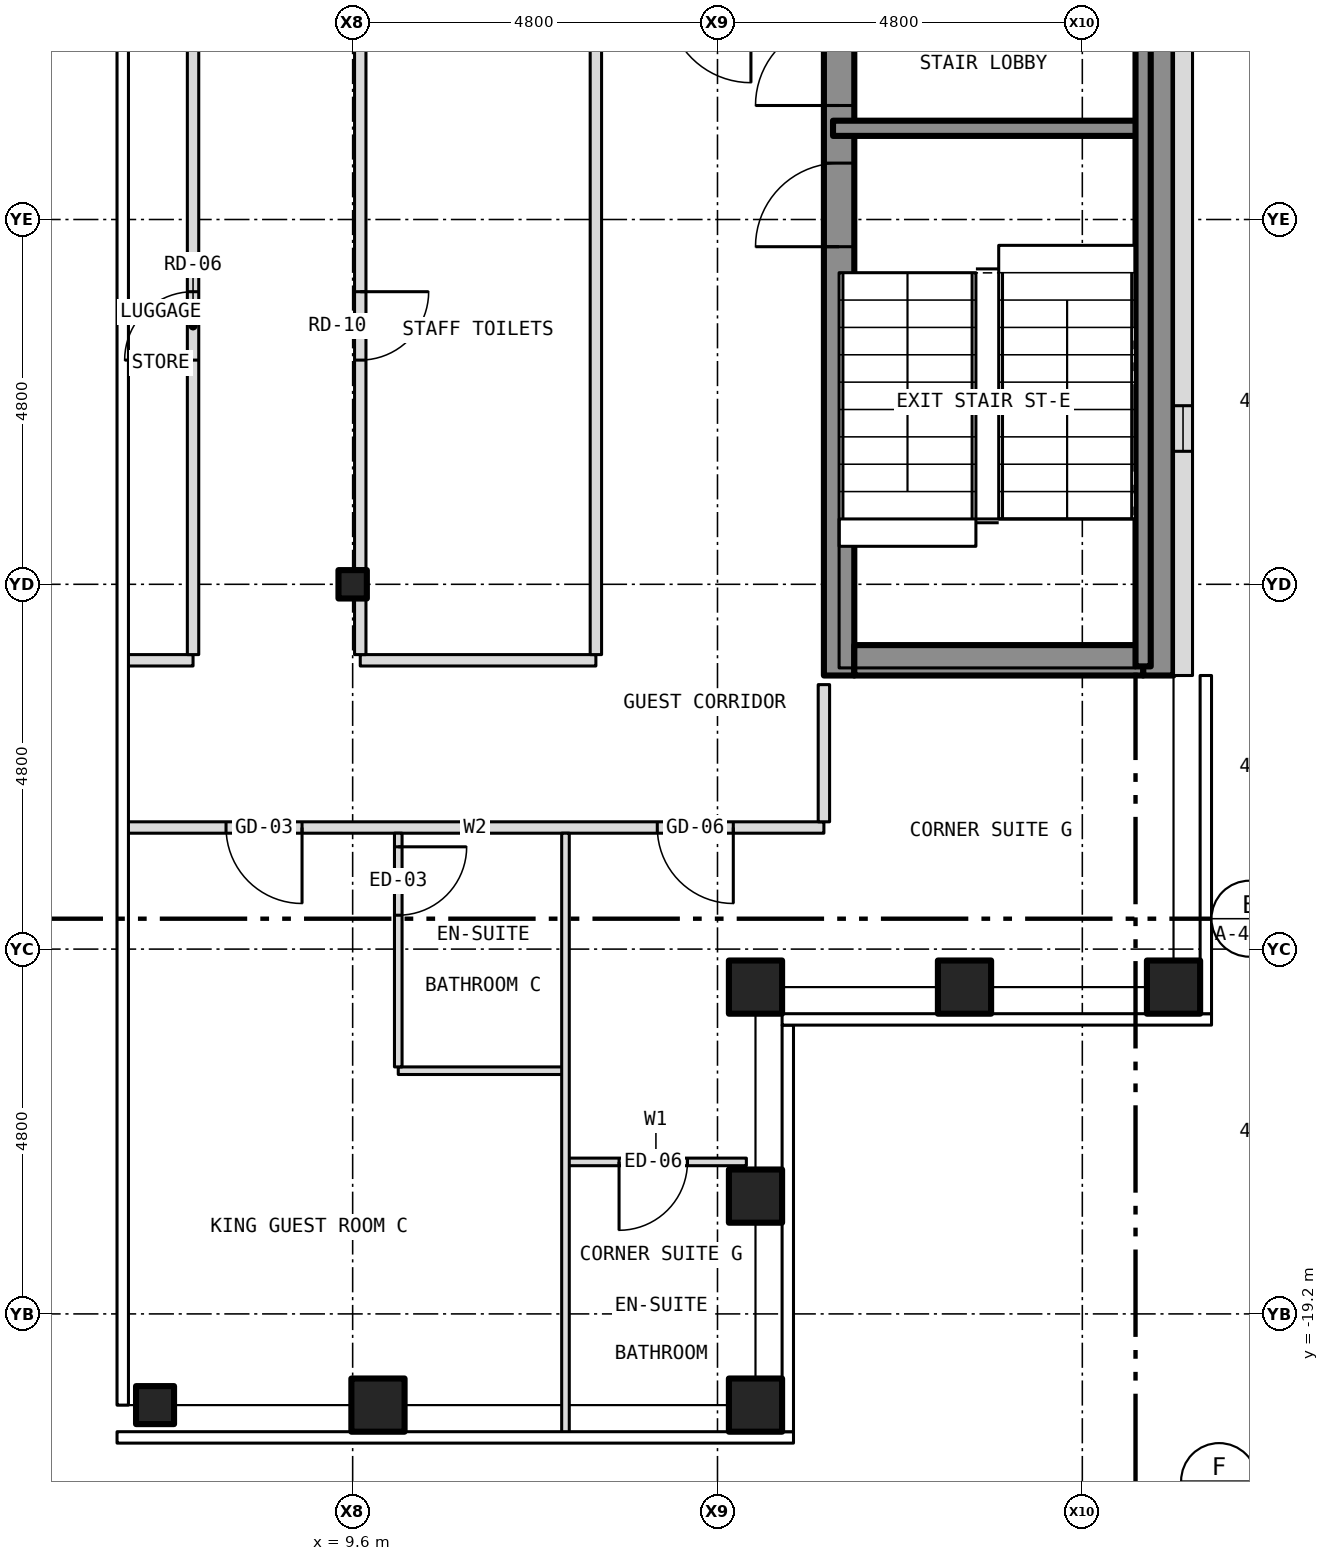
"""IFC4 building model, lengths in metres.
Left out: names, types, materials, properties, quantities, classifications, styles, units other than length and angle.
Written with IfcOpenShell. Run it as: python <this file> out.ifc"""

import sys

from ifc_helpers import new_model, si_unit, direction, frame, frame_2d, origin, origin_2d, place, context, subcontext, project, spatial, rectangle, hollow_rectangle, i_section, extrude, element, fill, save


model = new_model("IFC4")
c1 = context("Model", 3, precision=1e-05, world=origin(), true_north=direction((0.0, 1.0)))
c2 = subcontext(c1, "Body", "Model", "MODEL_VIEW")
j1 = project(units=[si_unit("LENGTHUNIT", "METRE"), si_unit("PLANEANGLEUNIT", "RADIAN")], contexts=[c1])
p1 = place(None, origin())
s1 = spatial("IfcSite", under=j1, at=p1, CompositionType="ELEMENT")
p2 = place(p1, origin())
s2 = spatial("IfcBuilding", under=s1, at=p2, CompositionType="ELEMENT")
p3 = place(p2, frame((0.0, 0.0, 233.0)))
s3 = spatial("IfcBuildingStorey", under=s2, at=p3, CompositionType="ELEMENT", Elevation=233.0)
for number, where, z_axis, x_axis in (
    (1, (9.933, -20.4, -0.15), (0.0, 0.0, 1.0), (1.0, 0.0, 0.0)),
    (2, (14.9, -20.4, -0.15), (0.0, 0.0, 1.0), (1.0, 0.0, 0.0)),
    (3, (20.4, -14.9, -0.15), (0.0, 0.0, 1.0), (1.0, 0.0, 0.0)),
    (4, (14.9, -14.9, -0.15), (0.0, 0.0, 1.0), (1.0, 0.0, 0.0)),
    (5, (14.9, -17.65, -0.15), (0.0, 0.0, 1.0), (1.0, 0.0, 0.0)),
    (6, (17.65, -14.9, -0.15), (0.0, 0.0, 1.0), (1.0, 0.0, 0.0)),
):
    element("IfcColumn", number, at=place(p3, frame(where, z_axis=z_axis, x_axis=x_axis)), inside=s3, PredefinedType="COLUMN", context=c2, shape_type="SweptSolid", body=[
        extrude(hollow_rectangle(XDim=0.7, YDim=0.7, WallThickness=0.04, at=origin_2d()), origin(), (0.0, 0.0, 1.0), 3.35),
    ])
p4 = place(p3, frame((7.0, -20.4, -0.15), z_axis=(0.0, 0.0, 1.0), x_axis=(1.0, 0.0, 0.0)))
e7 = element("IfcColumn", 7, at=p4, inside=s3, PredefinedType="COLUMN", context=c2, shape_type="SweptSolid", body=[
    extrude(hollow_rectangle(XDim=0.5, YDim=0.5, WallThickness=0.03, at=origin_2d()), origin(), (0.0, 0.0, 1.0), 3.35),
])
p5 = place(p3, frame((9.6, -9.6, -0.15), z_axis=(0.0, 0.0, 1.0), x_axis=(1.0, 0.0, 0.0)))
e8 = element("IfcColumn", 8, at=p5, inside=s3, PredefinedType="COLUMN", context=c2, shape_type="SweptSolid", body=[
    extrude(i_section(OverallWidth=0.373, OverallDepth=0.373, WebThickness=0.016, FlangeThickness=0.026, at=origin_2d()), origin(), (0.0, 0.0, 1.0), 3.35),
])
p6 = place(p3, frame((16.0, -10.8, 0.0), z_axis=(0.0, 0.0, 1.0), x_axis=(0.0, 1.0, 0.0)))
e9 = element("IfcWall", 9, at=p6, inside=s3, PredefinedType="SHEAR", context=c2, shape_type="SweptSolid", body=[
    extrude(rectangle(XDim=21.6, YDim=0.4, at=frame_2d((10.8, 0.0))), origin(), (0.0, 0.0, 1.0), 2.9),
])
p7 = place(p6, frame((9.4, 0.0, 0.0)))
e10 = element("IfcOpeningElement", 10, at=p7, cuts=e9, PredefinedType="OPENING", context=c2, shape_type="SweptSolid", body=[
    extrude(rectangle(XDim=1.1, YDim=2.1, at=frame_2d((0.55, 1.05))), frame((0.0, 0.212, 0.0), z_axis=(0.0, -1.0, 0.0), x_axis=(1.0, 0.0, 0.0)), (0.0, 0.0, 1.0), 0.424),
])
p8 = place(p6, frame((11.5, 0.0, 0.0)))
e11 = element("IfcOpeningElement", 11, at=p8, cuts=e9, PredefinedType="OPENING", context=c2, shape_type="SweptSolid", body=[
    extrude(rectangle(XDim=1.1, YDim=2.1, at=frame_2d((0.55, 1.05))), frame((0.0, 0.212, 0.0), z_axis=(0.0, -1.0, 0.0), x_axis=(1.0, 0.0, 0.0)), (0.0, 0.0, 1.0), 0.424),
])
p9 = place(p6, frame((13.6, 0.0, 0.0)))
e12 = element("IfcOpeningElement", 12, at=p9, cuts=e9, PredefinedType="OPENING", context=c2, shape_type="SweptSolid", body=[
    extrude(rectangle(XDim=1.1, YDim=2.1, at=frame_2d((0.55, 1.05))), frame((0.0, 0.212, 0.0), z_axis=(0.0, -1.0, 0.0), x_axis=(1.0, 0.0, 0.0)), (0.0, 0.0, 1.0), 0.424),
])
p10 = place(p6, frame((15.7, 0.0, 0.0)))
e13 = element("IfcOpeningElement", 13, at=p10, cuts=e9, PredefinedType="OPENING", context=c2, shape_type="SweptSolid", body=[
    extrude(rectangle(XDim=1.1, YDim=2.1, at=frame_2d((0.55, 1.05))), frame((0.0, 0.212, 0.0), z_axis=(0.0, -1.0, 0.0), x_axis=(1.0, 0.0, 0.0)), (0.0, 0.0, 1.0), 0.424),
])
p11 = place(p6, frame((17.8, 0.0, 0.0)))
e14 = element("IfcOpeningElement", 14, at=p11, cuts=e9, PredefinedType="OPENING", context=c2, shape_type="SweptSolid", body=[
    extrude(rectangle(XDim=1.1, YDim=2.1, at=frame_2d((0.55, 1.05))), frame((0.0, 0.212, 0.0), z_axis=(0.0, -1.0, 0.0), x_axis=(1.0, 0.0, 0.0)), (0.0, 0.0, 1.0), 0.424),
])
p12 = place(p6, frame((5.642, 0.0, 0.0)))
e15 = element("IfcOpeningElement", 15, at=p12, cuts=e9, PredefinedType="OPENING", context=c2, shape_type="SweptSolid", body=[
    extrude(rectangle(XDim=1.1, YDim=2.1, at=frame_2d((0.55, 1.05))), frame((0.0, 0.212, 0.0), z_axis=(0.0, -1.0, 0.0), x_axis=(1.0, 0.0, 0.0)), (0.0, 0.0, 1.0), 0.424),
])
p13 = place(p6, frame((7.5, 0.0, 0.0)))
e16 = element("IfcOpeningElement", 16, at=p13, cuts=e9, PredefinedType="OPENING", context=c2, shape_type="SweptSolid", body=[
    extrude(rectangle(XDim=1.1, YDim=2.1, at=frame_2d((0.55, 1.05))), frame((0.0, 0.212, 0.0), z_axis=(0.0, -1.0, 0.0), x_axis=(1.0, 0.0, 0.0)), (0.0, 0.0, 1.0), 0.424),
])
p14 = place(p6, frame((20.0, 0.0, 0.0)))
e17 = element("IfcOpeningElement", 17, at=p14, cuts=e9, PredefinedType="OPENING", context=c2, shape_type="SweptSolid", body=[
    extrude(rectangle(XDim=0.9, YDim=2.1, at=frame_2d((0.45, 1.05))), frame((0.0, 0.212, 0.0), z_axis=(0.0, -1.0, 0.0), x_axis=(1.0, 0.0, 0.0)), (0.0, 0.0, 1.0), 0.424),
])
p15 = place(p3, frame((20.2, -10.8, 0.0), z_axis=(0.0, 0.0, 1.0), x_axis=(0.0, 1.0, 0.0)))
e18 = element("IfcWall", 18, at=p15, inside=s3, PredefinedType="SHEAR", context=c2, shape_type="SweptSolid", body=[
    extrude(rectangle(XDim=21.6, YDim=0.4, at=frame_2d((10.8, 0.0))), origin(), (0.0, 0.0, 1.0), 2.9),
])
p16 = place(p3, frame((16.2, -10.6, 0.0), z_axis=(0.0, 0.0, 1.0), x_axis=(1.0, 0.0, 0.0)))
e19 = element("IfcWall", 19, at=p16, inside=s3, PredefinedType="SHEAR", context=c2, shape_type="SweptSolid", body=[
    extrude(rectangle(XDim=3.8, YDim=0.4, at=frame_2d((1.9, 0.0))), origin(), (0.0, 0.0, 1.0), 2.9),
])
p17 = place(p3, frame((20.525, -10.8, 0.0), z_axis=(0.0, 0.0, 1.0), x_axis=(0.0, 1.0, 0.0)))
e20 = element("IfcWall", 20, at=p17, inside=s3, PredefinedType="SOLIDWALL", context=c2, shape_type="SweptSolid", body=[
    extrude(rectangle(XDim=21.6, YDim=0.25, at=frame_2d((10.8, 0.0))), origin(), (0.0, 0.0, 1.0), 3.5),
])
p18 = place(p17, frame((2.95, 0.0, 1.0)))
e21 = element("IfcOpeningElement", 21, at=p18, cuts=e20, PredefinedType="OPENING", context=c2, shape_type="SweptSolid", body=[
    extrude(rectangle(XDim=0.6, YDim=1.5, at=frame_2d((0.3, 0.75))), frame((0.0, 0.137, 0.0), z_axis=(0.0, -1.0, 0.0), x_axis=(1.0, 0.0, 0.0)), (0.0, 0.0, 1.0), 0.274),
])
p19 = place(p3, frame((12.4, -17.2, 0.0), z_axis=(0.0, 0.0, 1.0), x_axis=(1.0, 0.0, 0.0)))
e22 = element("IfcWall", 22, at=p19, inside=s3, PredefinedType="PARTITIONING", context=c2, shape_type="SweptSolid", body=[
    extrude(rectangle(XDim=2.38, YDim=0.1, at=frame_2d((1.19, 0.0))), origin(), (0.0, 0.0, 1.0), 3.2),
])
p20 = place(p19, frame((0.705, 0.0, 0.0)))
e23 = element("IfcOpeningElement", 23, at=p20, cuts=e22, PredefinedType="OPENING", context=c2, shape_type="SweptSolid", body=[
    extrude(rectangle(XDim=0.9, YDim=2.1, at=frame_2d((0.45, 1.05))), frame((0.0, 0.062, 0.0), z_axis=(0.0, -1.0, 0.0), x_axis=(1.0, 0.0, 0.0)), (0.0, 0.0, 1.0), 0.124),
])
p21 = place(p3, frame((10.2, -16.0, 0.0), z_axis=(0.0, 0.0, 1.0), x_axis=(1.0, 0.0, 0.0)))
e24 = element("IfcWall", 24, at=p21, inside=s3, PredefinedType="PARTITIONING", context=c2, shape_type="SweptSolid", body=[
    extrude(rectangle(XDim=2.2, YDim=0.1, at=frame_2d((1.1, 0.0))), origin(), (0.0, 0.0, 1.0), 3.2),
])
p22 = place(p3, frame((6.62, -12.8, 0.0), z_axis=(0.0, 0.0, 1.0), x_axis=(1.0, 0.0, 0.0)))
e25 = element("IfcWall", 25, at=p22, inside=s3, PredefinedType="PARTITIONING", context=c2, shape_type="SweptSolid", body=[
    extrude(rectangle(XDim=9.18, YDim=0.15, at=frame_2d((4.59, 0.0))), origin(), (0.0, 0.0, 1.0), 3.2),
])
p23 = place(p22, frame((1.314, 0.0, 0.0)))
e26 = element("IfcOpeningElement", 26, at=p23, cuts=e25, PredefinedType="OPENING", context=c2, shape_type="SweptSolid", body=[
    extrude(rectangle(XDim=1.0, YDim=2.1, at=frame_2d((0.5, 1.05))), frame((0.0, 0.087, 0.0), z_axis=(0.0, -1.0, 0.0), x_axis=(1.0, 0.0, 0.0)), (0.0, 0.0, 1.0), 0.174),
])
p24 = place(p22, frame((6.988, 0.0, 0.0)))
e27 = element("IfcOpeningElement", 27, at=p24, cuts=e25, PredefinedType="OPENING", context=c2, shape_type="SweptSolid", body=[
    extrude(rectangle(XDim=1.0, YDim=2.1, at=frame_2d((0.5, 1.05))), frame((0.0, 0.087, 0.0), z_axis=(0.0, -1.0, 0.0), x_axis=(1.0, 0.0, 0.0)), (0.0, 0.0, 1.0), 0.174),
])
p25 = place(p3, frame((6.62, -10.6, 0.0), z_axis=(0.0, 0.0, 1.0), x_axis=(1.0, 0.0, 0.0)))
e28 = element("IfcWall", 28, at=p25, inside=s3, PredefinedType="PARTITIONING", context=c2, shape_type="SweptSolid", body=[
    extrude(rectangle(XDim=0.88, YDim=0.15, at=frame_2d((0.44, 0.0))), origin(), (0.0, 0.0, 1.0), 3.2),
])
p26 = place(p3, frame((9.7, -10.6, 0.0), z_axis=(0.0, 0.0, 1.0), x_axis=(1.0, 0.0, 0.0)))
e29 = element("IfcWall", 29, at=p26, inside=s3, PredefinedType="PARTITIONING", context=c2, shape_type="SweptSolid", body=[
    extrude(rectangle(XDim=3.1, YDim=0.15, at=frame_2d((1.55, 0.0))), origin(), (0.0, 0.0, 1.0), 3.2),
])
p27 = place(p3, frame((15.92, -3.6, 0.0), z_axis=(0.0, 0.0, 1.0), x_axis=(1.0, 0.0, 0.0)))
e30 = element("IfcWall", 30, at=p27, inside=s3, PredefinedType="SHEAR", context=c2, shape_type="SweptSolid", body=[
    extrude(rectangle(XDim=4.08, YDim=0.2, at=frame_2d((2.04, 0.0))), origin(), (0.0, 0.0, 1.0), 2.9),
])
p28 = place(p3, frame((7.5, -10.525, 0.0), z_axis=(0.0, 0.0, 1.0), x_axis=(0.0, 1.0, 0.0)))
e31 = element("IfcWall", 31, at=p28, inside=s3, PredefinedType="PARTITIONING", context=c2, shape_type="SweptSolid", body=[
    extrude(rectangle(XDim=8.725, YDim=0.15, at=frame_2d((4.362, 0.0))), origin(), (0.0, 0.0, 1.0), 3.2),
])
p29 = place(p28, frame((3.875, 0.0, 0.0)))
e32 = element("IfcOpeningElement", 32, at=p29, cuts=e31, PredefinedType="OPENING", context=c2, shape_type="SweptSolid", body=[
    extrude(rectangle(XDim=0.9, YDim=2.1, at=frame_2d((0.45, 1.05))), frame((0.0, 0.087, 0.0), z_axis=(0.0, -1.0, 0.0), x_axis=(1.0, 0.0, 0.0)), (0.0, 0.0, 1.0), 0.174),
])
p30 = place(p3, frame((9.7, -10.525, 0.0), z_axis=(0.0, 0.0, 1.0), x_axis=(0.0, 1.0, 0.0)))
e33 = element("IfcWall", 33, at=p30, inside=s3, PredefinedType="PARTITIONING", context=c2, shape_type="SweptSolid", body=[
    extrude(rectangle(XDim=0.725, YDim=0.15, at=frame_2d((0.362, 0.0))), origin(), (0.0, 0.0, 1.0), 2.578),
])
p31 = place(p3, frame((9.7, -9.8, 0.0), z_axis=(0.0, 0.0, 1.0), x_axis=(0.0, 1.0, 0.0)))
e34 = element("IfcWall", 34, at=p31, inside=s3, PredefinedType="PARTITIONING", context=c2, shape_type="SweptSolid", body=[
    extrude(rectangle(XDim=0.401, YDim=0.15, at=frame_2d((0.201, 0.0))), origin(), (0.0, 0.0, 1.0), 3.2),
])
p32 = place(p3, frame((9.7, -9.399, 0.0), z_axis=(0.0, 0.0, 1.0), x_axis=(0.0, 1.0, 0.0)))
e35 = element("IfcWall", 35, at=p32, inside=s3, PredefinedType="PARTITIONING", context=c2, shape_type="SweptSolid", body=[
    extrude(rectangle(XDim=7.524, YDim=0.15, at=frame_2d((3.762, 0.0))), origin(), (0.0, 0.0, 1.0), 2.578),
])
p33 = place(p32, frame((2.749, 0.0, 0.0)))
e36 = element("IfcOpeningElement", 36, at=p33, cuts=e35, PredefinedType="OPENING", context=c2, shape_type="SweptSolid", body=[
    extrude(rectangle(XDim=0.9, YDim=2.1, at=frame_2d((0.45, 1.05))), frame((0.0, 0.087, 0.0), z_axis=(0.0, -1.0, 0.0), x_axis=(1.0, 0.0, 0.0)), (0.0, 0.0, 1.0), 0.174),
])
p34 = place(p3, frame((10.2, -15.95, 0.0), z_axis=(0.0, 0.0, 1.0), x_axis=(0.0, 1.0, 0.0)))
e37 = element("IfcWall", 37, at=p34, inside=s3, PredefinedType="PARTITIONING", context=c2, shape_type="SweptSolid", body=[
    extrude(rectangle(XDim=3.075, YDim=0.1, at=frame_2d((1.538, 0.0))), origin(), (0.0, 0.0, 1.0), 3.2),
])
p35 = place(p34, frame((1.996, 0.0, 0.0)))
e38 = element("IfcOpeningElement", 38, at=p35, cuts=e37, PredefinedType="OPENING", context=c2, shape_type="SweptSolid", body=[
    extrude(rectangle(XDim=0.9, YDim=2.1, at=frame_2d((0.45, 1.05))), frame((0.0, 0.062, 0.0), z_axis=(0.0, -1.0, 0.0), x_axis=(1.0, 0.0, 0.0)), (0.0, 0.0, 1.0), 0.124),
])
p36 = place(p3, frame((12.4, -20.78, 0.0), z_axis=(0.0, 0.0, 1.0), x_axis=(0.0, 1.0, 0.0)))
e39 = element("IfcWall", 39, at=p36, inside=s3, PredefinedType="PARTITIONING", context=c2, shape_type="SweptSolid", body=[
    extrude(rectangle(XDim=7.905, YDim=0.1, at=frame_2d((3.953, 0.0))), origin(), (0.0, 0.0, 1.0), 3.2),
])
p37 = place(p3, frame((12.8, -10.525, 0.0), z_axis=(0.0, 0.0, 1.0), x_axis=(0.0, 1.0, 0.0)))
e40 = element("IfcWall", 40, at=p37, inside=s3, PredefinedType="PARTITIONING", context=c2, shape_type="SweptSolid", body=[
    extrude(rectangle(XDim=8.525, YDim=0.15, at=frame_2d((4.262, 0.0))), origin(), (0.0, 0.0, 1.0), 3.2),
])
p38 = place(p3, frame((15.8, -12.725, 0.0), z_axis=(0.0, 0.0, 1.0), x_axis=(0.0, 1.0, 0.0)))
e41 = element("IfcWall", 41, at=p38, inside=s3, PredefinedType="PARTITIONING", context=c2, shape_type="SweptSolid", body=[
    extrude(rectangle(XDim=1.805, YDim=0.15, at=frame_2d((0.903, 0.0))), origin(), (0.0, 0.0, 1.0), 3.2),
])
p39 = place(p3, frame((20.0, -10.68, 0.0), z_axis=(0.0, 0.0, 1.0), x_axis=(0.0, 1.0, 0.0)))
e42 = element("IfcWall", 42, at=p39, inside=s3, PredefinedType="SHEAR", context=c2, shape_type="SweptSolid", body=[
    extrude(rectangle(XDim=8.68, YDim=0.2, at=frame_2d((4.34, 0.0))), origin(), (0.0, 0.0, 1.0), 2.9),
])
p40 = place(p18, origin())
e43 = element("IfcWindow", 43, at=p40, inside=s3, PartitioningType="SINGLE_PANEL", PredefinedType="WINDOW", context=c2, shape_type="SweptSolid", body=[
    extrude(rectangle(XDim=0.6, YDim=1.5, at=frame_2d((0.3, 0.75))), frame((0.0, -0.035, 0.0), z_axis=(0.0, -1.0, 0.0), x_axis=(1.0, 0.0, 0.0)), (0.0, 0.0, 1.0), 0.06),
])
fill(e21, e43)
p41 = place(p12, origin())
e44 = element("IfcDoor", 44, at=p41, inside=s3, OperationType="SINGLE_SWING_LEFT", PredefinedType="DOOR", context=c2, shape_type="SweptSolid", body=[
    extrude(rectangle(XDim=1.1, YDim=2.1, at=frame_2d((0.55, 1.05))), frame((0.0, 0.025, 0.0), z_axis=(0.0, -1.0, 0.0), x_axis=(1.0, 0.0, 0.0)), (0.0, 0.0, 1.0), 0.05),
])
fill(e15, e44)
p42 = place(p13, origin())
e45 = element("IfcDoor", 45, at=p42, inside=s3, OperationType="SINGLE_SWING_LEFT", PredefinedType="DOOR", context=c2, shape_type="SweptSolid", body=[
    extrude(rectangle(XDim=1.1, YDim=2.1, at=frame_2d((0.55, 1.05))), frame((0.0, 0.025, 0.0), z_axis=(0.0, -1.0, 0.0), x_axis=(1.0, 0.0, 0.0)), (0.0, 0.0, 1.0), 0.05),
])
fill(e16, e45)
p43 = place(p23, origin())
e46 = element("IfcDoor", 46, at=p43, inside=s3, OperationType="SINGLE_SWING_RIGHT", PredefinedType="DOOR", context=c2, shape_type="SweptSolid", body=[
    extrude(rectangle(XDim=1.0, YDim=2.1, at=frame_2d((0.5, 1.05))), frame((0.0, 0.025, 0.0), z_axis=(0.0, -1.0, 0.0), x_axis=(1.0, 0.0, 0.0)), (0.0, 0.0, 1.0), 0.05),
])
fill(e26, e46)
p44 = place(p35, origin())
e47 = element("IfcDoor", 47, at=p44, inside=s3, OperationType="SINGLE_SWING_RIGHT", PredefinedType="DOOR", context=c2, shape_type="SweptSolid", body=[
    extrude(rectangle(XDim=0.9, YDim=2.1, at=frame_2d((0.45, 1.05))), frame((0.0, 0.025, 0.0), z_axis=(0.0, -1.0, 0.0), x_axis=(1.0, 0.0, 0.0)), (0.0, 0.0, 1.0), 0.05),
])
fill(e38, e47)
p45 = place(p20, origin())
e48 = element("IfcDoor", 48, at=p45, inside=s3, OperationType="SINGLE_SWING_LEFT", PredefinedType="DOOR", context=c2, shape_type="SweptSolid", body=[
    extrude(rectangle(XDim=0.9, YDim=2.1, at=frame_2d((0.45, 1.05))), frame((0.0, 0.025, 0.0), z_axis=(0.0, -1.0, 0.0), x_axis=(1.0, 0.0, 0.0)), (0.0, 0.0, 1.0), 0.05),
])
fill(e23, e48)
p46 = place(p24, origin())
e49 = element("IfcDoor", 49, at=p46, inside=s3, OperationType="SINGLE_SWING_RIGHT", PredefinedType="DOOR", context=c2, shape_type="SweptSolid", body=[
    extrude(rectangle(XDim=1.0, YDim=2.1, at=frame_2d((0.5, 1.05))), frame((0.0, 0.025, 0.0), z_axis=(0.0, -1.0, 0.0), x_axis=(1.0, 0.0, 0.0)), (0.0, 0.0, 1.0), 0.05),
])
fill(e27, e49)
p47 = place(p29, origin())
e50 = element("IfcDoor", 50, at=p47, inside=s3, OperationType="SINGLE_SWING_LEFT", PredefinedType="DOOR", context=c2, shape_type="SweptSolid", body=[
    extrude(rectangle(XDim=0.9, YDim=2.1, at=frame_2d((0.45, 1.05))), frame((0.0, 0.025, 0.0), z_axis=(0.0, -1.0, 0.0), x_axis=(1.0, 0.0, 0.0)), (0.0, 0.0, 1.0), 0.05),
])
fill(e32, e50)
p48 = place(p33, origin())
e51 = element("IfcDoor", 51, at=p48, inside=s3, OperationType="SINGLE_SWING_RIGHT", PredefinedType="DOOR", context=c2, shape_type="SweptSolid", body=[
    extrude(rectangle(XDim=0.9, YDim=2.1, at=frame_2d((0.45, 1.05))), frame((0.0, 0.025, 0.0), z_axis=(0.0, -1.0, 0.0), x_axis=(1.0, 0.0, 0.0)), (0.0, 0.0, 1.0), 0.05),
])
fill(e36, e51)
save(model, sys.argv[1])
